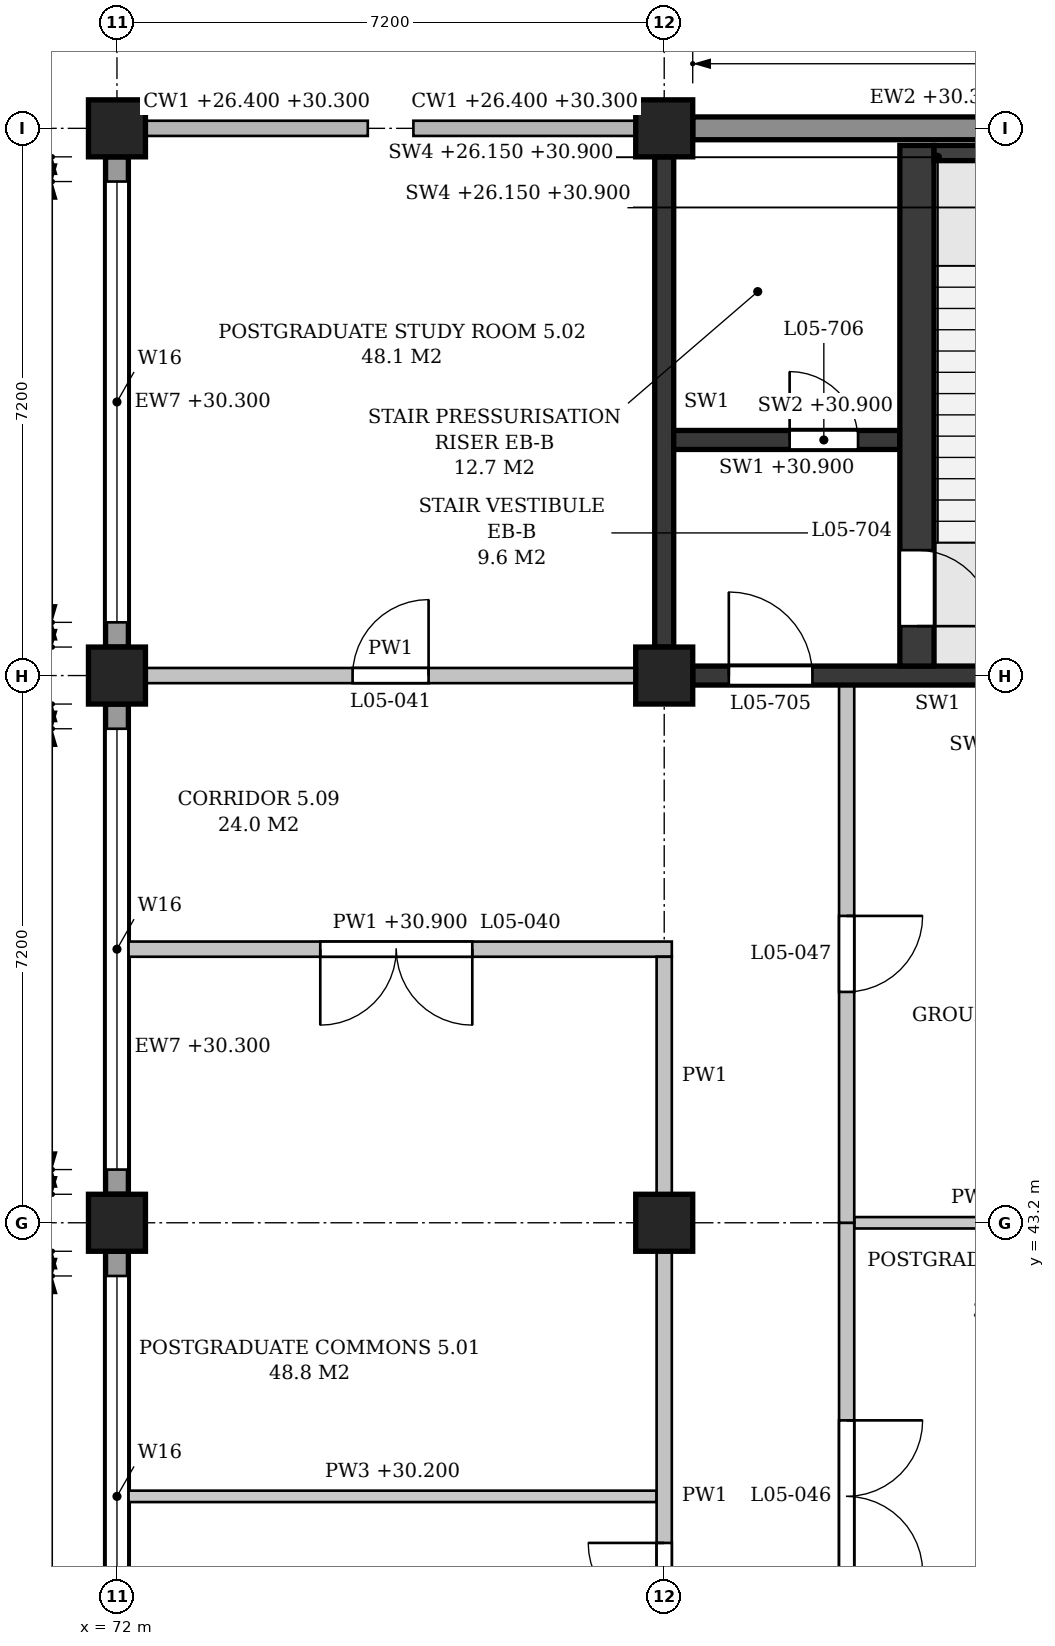
"""IFC4 building model, lengths in metres.
Left out: names, types, materials, properties, quantities, classifications, styles, units other than length and angle.
Written with IfcOpenShell. Run it as: python <this file> out.ifc"""

import sys

from ifc_helpers import new_model, si_unit, direction, frame, frame_2d, origin, origin_2d, place, context, subcontext, project, spatial, polyline, rectangle, outline, extrude, element, fill, save


model = new_model("IFC4")
c1 = context("Model", 3, precision=1e-05, world=origin(), true_north=direction((0.0, 1.0)))
c2 = subcontext(c1, "Body", "Model", "MODEL_VIEW")
j1 = project(units=[si_unit("LENGTHUNIT", "METRE"), si_unit("PLANEANGLEUNIT", "RADIAN")], contexts=[c1])
p1 = place(None, origin())
s1 = spatial("IfcSite", under=j1, at=p1, CompositionType="ELEMENT")
p2 = place(p1, origin())
s2 = spatial("IfcBuilding", under=s1, at=p2, CompositionType="ELEMENT")
p3 = place(p2, frame((0.0, 0.0, 26.4)))
s3 = spatial("IfcBuildingStorey", under=s2, at=p3, CompositionType="ELEMENT", Elevation=26.4)
for number, where, z_axis, x_axis in (
    (1, (72.0, 43.2, 0.0), (0.0, 0.0, 1.0), (1.0, 0.0, 0.0)),
    (2, (72.0, 50.4, 0.0), (0.0, 0.0, 1.0), (1.0, 0.0, 0.0)),
    (3, (72.0, 57.6, 0.0), (0.0, 0.0, 1.0), (1.0, 0.0, 0.0)),
    (4, (79.2, 43.2, 0.0), (0.0, 0.0, 1.0), (1.0, 0.0, 0.0)),
    (5, (79.2, 50.4, 0.0), (0.0, 0.0, 1.0), (1.0, 0.0, 0.0)),
    (6, (79.2, 57.6, 0.0), (0.0, 0.0, 1.0), (1.0, 0.0, 0.0)),
):
    element("IfcColumn", number, at=place(p3, frame(where, z_axis=z_axis, x_axis=x_axis)), inside=s3, PredefinedType="COLUMN", context=c2, shape_type="SweptSolid", body=[
        extrude(rectangle(XDim=0.75, YDim=0.75, at=origin_2d()), origin(), (0.0, 0.0, 1.0), 4.8),
    ])
p4 = place(p3, frame((86.025, 57.6, 0.0), z_axis=(0.0, 0.0, 1.0), x_axis=(-1.0, 0.0, 0.0)))
e7 = element("IfcWall", 7, at=p4, inside=s3, PredefinedType="STANDARD", context=c2, shape_type="SweptSolid", body=[
    extrude(rectangle(XDim=6.45, YDim=0.3, at=frame_2d((3.225, 0.0))), origin(), (0.0, 0.0, 1.0), 3.9),
])
p5 = place(p4, frame((0.975, 0.0, 0.9)))
e8 = element("IfcOpeningElement", 8, at=p5, cuts=e7, PredefinedType="OPENING", context=c2, shape_type="SweptSolid", body=[
    extrude(outline(polyline([(0.0, 0.0), (0.9, 0.0), (0.9, 2.05), (0.45, 2.5), (0.0, 2.05), (0.0, 0.0)])), frame((0.0, 0.16, 0.0), z_axis=(0.0, -1.0, 0.0), x_axis=(1.0, 0.0, 0.0)), (0.0, 0.0, 1.0), 0.32),
])
p6 = place(p3, frame((72.0, 36.375, 0.0), z_axis=(0.0, 0.0, 1.0), x_axis=(0.0, 1.0, 0.0)))
e9 = element("IfcWall", 9, at=p6, inside=s3, PredefinedType="STANDARD", context=c2, shape_type="SweptSolid", body=[
    extrude(rectangle(XDim=6.45, YDim=0.3, at=frame_2d((3.225, 0.0))), origin(), (0.0, 0.0, 1.0), 3.9),
])
p7 = place(p6, frame((0.325, 0.0, 1.5)))
e10 = element("IfcOpeningElement", 10, at=p7, cuts=e9, PredefinedType="OPENING", context=c2, shape_type="SweptSolid", body=[
    extrude(outline(polyline([(0.0, 0.0), (5.8, 0.0), (5.8, 0.4), (2.9, 1.9), (0.0, 0.4), (0.0, 0.0)])), frame((0.0, 0.16, 0.0), z_axis=(0.0, -1.0, 0.0), x_axis=(1.0, 0.0, 0.0)), (0.0, 0.0, 1.0), 0.32),
])
p8 = place(p3, frame((72.0, 43.575, 0.0), z_axis=(0.0, 0.0, 1.0), x_axis=(0.0, 1.0, 0.0)))
e11 = element("IfcWall", 11, at=p8, inside=s3, PredefinedType="STANDARD", context=c2, shape_type="SweptSolid", body=[
    extrude(rectangle(XDim=6.45, YDim=0.3, at=frame_2d((3.225, 0.0))), origin(), (0.0, 0.0, 1.0), 3.9),
])
p9 = place(p8, frame((0.325, 0.0, 1.5)))
e12 = element("IfcOpeningElement", 12, at=p9, cuts=e11, PredefinedType="OPENING", context=c2, shape_type="SweptSolid", body=[
    extrude(outline(polyline([(0.0, 0.0), (5.8, 0.0), (5.8, 0.4), (2.9, 1.9), (0.0, 0.4), (0.0, 0.0)])), frame((0.0, 0.16, 0.0), z_axis=(0.0, -1.0, 0.0), x_axis=(1.0, 0.0, 0.0)), (0.0, 0.0, 1.0), 0.32),
])
p10 = place(p3, frame((72.0, 50.775, 0.0), z_axis=(0.0, 0.0, 1.0), x_axis=(0.0, 1.0, 0.0)))
e13 = element("IfcWall", 13, at=p10, inside=s3, PredefinedType="STANDARD", context=c2, shape_type="SweptSolid", body=[
    extrude(rectangle(XDim=6.45, YDim=0.3, at=frame_2d((3.225, 0.0))), origin(), (0.0, 0.0, 1.0), 3.9),
])
p11 = place(p10, frame((0.325, 0.0, 1.5)))
e14 = element("IfcOpeningElement", 14, at=p11, cuts=e13, PredefinedType="OPENING", context=c2, shape_type="SweptSolid", body=[
    extrude(outline(polyline([(0.0, 0.0), (5.8, 0.0), (5.8, 0.4), (2.9, 1.9), (0.0, 0.4), (0.0, 0.0)])), frame((0.0, 0.16, 0.0), z_axis=(0.0, -1.0, 0.0), x_axis=(1.0, 0.0, 0.0)), (0.0, 0.0, 1.0), 0.32),
])
p12 = place(p3, frame((79.575, 50.4, 0.0), z_axis=(0.0, 0.0, 1.0), x_axis=(1.0, 0.0, 0.0)))
e15 = element("IfcWall", 15, at=p12, inside=s3, PredefinedType="SHEAR", context=c2, shape_type="SweptSolid", body=[
    extrude(rectangle(XDim=6.45, YDim=0.25, at=frame_2d((3.225, 0.0))), origin(), (0.0, 0.0, 1.0), 3.85),
])
p13 = place(p12, frame((0.475, 0.0, 0.0)))
e16 = element("IfcOpeningElement", 16, at=p13, cuts=e15, PredefinedType="OPENING", context=c2, shape_type="SweptSolid", body=[
    extrude(rectangle(XDim=1.1, YDim=2.1, at=frame_2d((0.55, 1.05))), frame((0.0, 0.135, 0.0), z_axis=(0.0, -1.0, 0.0), x_axis=(1.0, 0.0, 0.0)), (0.0, 0.0, 1.0), 0.27),
])
p14 = place(p3, frame((79.2, 50.775, 0.0), z_axis=(0.0, 0.0, 1.0), x_axis=(0.0, 1.0, 0.0)))
e17 = element("IfcWall", 17, at=p14, inside=s3, PredefinedType="SHEAR", context=c2, shape_type="SweptSolid", body=[
    extrude(rectangle(XDim=6.45, YDim=0.25, at=frame_2d((3.225, 0.0))), origin(), (0.0, 0.0, 1.0), 3.85),
])
p15 = place(p3, frame((82.75, 57.275, -0.25), z_axis=(0.0, 0.0, 1.0), x_axis=(1.0, 0.0, 0.0)))
e18 = element("IfcWall", 18, at=p15, inside=s3, PredefinedType="SHEAR", context=c2, shape_type="SweptSolid", body=[
    extrude(rectangle(XDim=1.4, YDim=0.2, at=frame_2d((0.7, 0.0))), origin(), (0.0, 0.0, 1.0), 4.75),
])
p16 = place(p3, frame((82.525, 50.525, 0.0), z_axis=(0.0, 0.0, 1.0), x_axis=(0.0, 1.0, 0.0)))
e19 = element("IfcWall", 19, at=p16, inside=s3, PredefinedType="SHEAR", context=c2, shape_type="SweptSolid", body=[
    extrude(rectangle(XDim=6.85, YDim=0.45, at=frame_2d((3.425, 0.0))), origin(), (0.0, 0.0, 1.0), 4.5),
])
p17 = place(p16, frame((0.525, 0.0, 0.0)))
e20 = element("IfcOpeningElement", 20, at=p17, cuts=e19, PredefinedType="OPENING", context=c2, shape_type="SweptSolid", body=[
    extrude(rectangle(XDim=1.0, YDim=2.1, at=frame_2d((0.5, 1.05))), frame((0.0, 0.235, 0.0), z_axis=(0.0, -1.0, 0.0), x_axis=(1.0, 0.0, 0.0)), (0.0, 0.0, 1.0), 0.47),
])
p18 = place(p3, frame((79.325, 53.5, 0.0), z_axis=(0.0, 0.0, 1.0), x_axis=(1.0, 0.0, 0.0)))
e21 = element("IfcWall", 21, at=p18, inside=s3, PredefinedType="SHEAR", context=c2, shape_type="SweptSolid", body=[
    extrude(rectangle(XDim=2.975, YDim=0.25, at=frame_2d((1.488, 0.0))), origin(), (0.0, 0.0, 1.0), 4.5),
])
p19 = place(p18, frame((1.525, 0.0, 0.0)))
e22 = element("IfcOpeningElement", 22, at=p19, cuts=e21, PredefinedType="OPENING", context=c2, shape_type="SweptSolid", body=[
    extrude(rectangle(XDim=0.9, YDim=2.1, at=frame_2d((0.45, 1.05))), frame((0.0, 0.135, 0.0), z_axis=(0.0, -1.0, 0.0), x_axis=(1.0, 0.0, 0.0)), (0.0, 0.0, 1.0), 0.27),
])
p20 = place(p3, frame((72.15, 39.6, 0.0), z_axis=(0.0, 0.0, 1.0), x_axis=(1.0, 0.0, 0.0)))
e23 = element("IfcWall", 23, at=p20, inside=s3, PredefinedType="PARTITIONING", context=c2, shape_type="SweptSolid", body=[
    extrude(rectangle(XDim=6.95, YDim=0.15, at=frame_2d((3.475, 0.0))), origin(), (0.0, 0.0, 1.0), 3.8),
])
p21 = place(p3, frame((81.7, 43.2, 0.0), z_axis=(0.0, 0.0, 1.0), x_axis=(1.0, 0.0, 0.0)))
e24 = element("IfcWall", 24, at=p21, inside=s3, PredefinedType="PARTITIONING", context=c2, shape_type="SweptSolid", body=[
    extrude(rectangle(XDim=4.325, YDim=0.15, at=frame_2d((2.163, 0.0))), origin(), (0.0, 0.0, 1.0), 3.8),
])
p22 = place(p3, frame((72.15, 46.8, 0.0), z_axis=(0.0, 0.0, 1.0), x_axis=(1.0, 0.0, 0.0)))
e25 = element("IfcWall", 25, at=p22, inside=s3, PredefinedType="PARTITIONING", context=c2, shape_type="SweptSolid", body=[
    extrude(outline(polyline([(0.0, 0.0), (7.15, 0.0), (7.15, 3.85), (6.825, 3.85), (6.825, 4.5), (0.05, 4.5), (0.05, 3.9), (0.0, 3.9), (0.0, 0.0)])), frame((0.0, 0.1, 0.0), z_axis=(0.0, -1.0, 0.0), x_axis=(1.0, 0.0, 0.0)), (0.0, 0.0, 1.0), 0.2),
])
p23 = place(p22, frame((2.525, 0.0, 0.0)))
e26 = element("IfcOpeningElement", 26, at=p23, cuts=e25, PredefinedType="OPENING", context=c2, shape_type="SweptSolid", body=[
    extrude(rectangle(XDim=2.0, YDim=2.1, at=frame_2d((1.0, 1.05))), frame((0.0, 0.11, 0.0), z_axis=(0.0, -1.0, 0.0), x_axis=(1.0, 0.0, 0.0)), (0.0, 0.0, 1.0), 0.22),
])
p24 = place(p3, frame((72.375, 50.4, 0.0), z_axis=(0.0, 0.0, 1.0), x_axis=(1.0, 0.0, 0.0)))
e27 = element("IfcWall", 27, at=p24, inside=s3, PredefinedType="PARTITIONING", context=c2, shape_type="SweptSolid", body=[
    extrude(rectangle(XDim=6.45, YDim=0.2, at=frame_2d((3.225, 0.0))), origin(), (0.0, 0.0, 1.0), 3.85),
])
p25 = place(p24, frame((2.725, 0.0, 0.0)))
e28 = element("IfcOpeningElement", 28, at=p25, cuts=e27, PredefinedType="OPENING", context=c2, shape_type="SweptSolid", body=[
    extrude(rectangle(XDim=1.0, YDim=2.1, at=frame_2d((0.5, 1.05))), frame((0.0, 0.11, 0.0), z_axis=(0.0, -1.0, 0.0), x_axis=(1.0, 0.0, 0.0)), (0.0, 0.0, 1.0), 0.22),
])
p26 = place(p3, frame((79.2, 36.375, 0.0), z_axis=(0.0, 0.0, 1.0), x_axis=(0.0, 1.0, 0.0)))
e29 = element("IfcWall", 29, at=p26, inside=s3, PredefinedType="PARTITIONING", context=c2, shape_type="SweptSolid", body=[
    extrude(rectangle(XDim=6.45, YDim=0.2, at=frame_2d((3.225, 0.0))), origin(), (0.0, 0.0, 1.0), 3.85),
])
p27 = place(p26, frame((0.613, 0.0, 0.0)))
e30 = element("IfcOpeningElement", 30, at=p27, cuts=e29, PredefinedType="OPENING", context=c2, shape_type="SweptSolid", body=[
    extrude(rectangle(XDim=2.0, YDim=2.1, at=frame_2d((1.0, 1.05))), frame((0.0, 0.11, 0.0), z_axis=(0.0, -1.0, 0.0), x_axis=(1.0, 0.0, 0.0)), (0.0, 0.0, 1.0), 0.22),
])
p28 = place(p3, frame((79.2, 43.575, 0.0), z_axis=(0.0, 0.0, 1.0), x_axis=(0.0, 1.0, 0.0)))
e31 = element("IfcWall", 31, at=p28, inside=s3, PredefinedType="PARTITIONING", context=c2, shape_type="SweptSolid", body=[
    extrude(rectangle(XDim=3.125, YDim=0.2, at=frame_2d((1.562, 0.0))), origin(), (0.0, 0.0, 1.0), 3.85),
])
p29 = place(p3, frame((81.6, 36.0, 0.0), z_axis=(0.0, 0.0, 1.0), x_axis=(0.0, 1.0, 0.0)))
e32 = element("IfcWall", 32, at=p29, inside=s3, PredefinedType="PARTITIONING", context=c2, shape_type="SweptSolid", body=[
    extrude(outline(polyline([(0.0, 0.0), (7.2, 0.0), (7.2, 3.85), (6.975, 3.85), (6.975, 4.5), (0.225, 4.5), (0.225, 3.85), (0.0, 3.85), (0.0, 0.0)])), frame((0.0, 0.1, 0.0), z_axis=(0.0, -1.0, 0.0), x_axis=(1.0, 0.0, 0.0)), (0.0, 0.0, 1.0), 0.2),
])
p30 = place(p29, frame((2.6, 0.0, 0.0)))
e33 = element("IfcOpeningElement", 33, at=p30, cuts=e32, PredefinedType="OPENING", context=c2, shape_type="SweptSolid", body=[
    extrude(rectangle(XDim=2.0, YDim=2.1, at=frame_2d((1.0, 1.05))), frame((0.0, 0.11, 0.0), z_axis=(0.0, -1.0, 0.0), x_axis=(1.0, 0.0, 0.0)), (0.0, 0.0, 1.0), 0.22),
])
p31 = place(p3, frame((81.6, 43.2, 0.0), z_axis=(0.0, 0.0, 1.0), x_axis=(0.0, 1.0, 0.0)))
e34 = element("IfcWall", 34, at=p31, inside=s3, PredefinedType="PARTITIONING", context=c2, shape_type="SweptSolid", body=[
    extrude(outline(polyline([(0.0, 0.0), (7.075, 0.0), (7.075, 3.85), (6.975, 3.85), (6.975, 4.5), (0.225, 4.5), (0.225, 3.85), (0.0, 3.85), (0.0, 0.0)])), frame((0.0, 0.1, 0.0), z_axis=(0.0, -1.0, 0.0), x_axis=(1.0, 0.0, 0.0)), (0.0, 0.0, 1.0), 0.2),
])
p32 = place(p31, frame((3.038, 0.0, 0.0)))
e35 = element("IfcOpeningElement", 35, at=p32, cuts=e34, PredefinedType="OPENING", context=c2, shape_type="SweptSolid", body=[
    extrude(rectangle(XDim=1.0, YDim=2.1, at=frame_2d((0.5, 1.05))), frame((0.0, 0.11, 0.0), z_axis=(0.0, -1.0, 0.0), x_axis=(1.0, 0.0, 0.0)), (0.0, 0.0, 1.0), 0.22),
])
p33 = place(p7, origin())
e36 = element("IfcWindow", 36, at=p33, inside=s3, PartitioningType="TRIPLE_PANEL_VERTICAL", PredefinedType="WINDOW", context=c2, shape_type="SweptSolid", body=[
    extrude(outline(polyline([(0.0, 0.0), (5.8, 0.0), (5.8, 0.4), (2.9, 1.9), (0.0, 0.4), (0.0, 0.0)])), frame((0.0, 0.03, 0.0), z_axis=(0.0, -1.0, 0.0), x_axis=(1.0, 0.0, 0.0)), (0.0, 0.0, 1.0), 0.06),
])
fill(e10, e36)
p34 = place(p9, origin())
e37 = element("IfcWindow", 37, at=p34, inside=s3, PartitioningType="TRIPLE_PANEL_VERTICAL", PredefinedType="WINDOW", context=c2, shape_type="SweptSolid", body=[
    extrude(outline(polyline([(0.0, 0.0), (5.8, 0.0), (5.8, 0.4), (2.9, 1.9), (0.0, 0.4), (0.0, 0.0)])), frame((0.0, 0.03, 0.0), z_axis=(0.0, -1.0, 0.0), x_axis=(1.0, 0.0, 0.0)), (0.0, 0.0, 1.0), 0.06),
])
fill(e12, e37)
p35 = place(p11, origin())
e38 = element("IfcWindow", 38, at=p35, inside=s3, PartitioningType="TRIPLE_PANEL_VERTICAL", PredefinedType="WINDOW", context=c2, shape_type="SweptSolid", body=[
    extrude(outline(polyline([(0.0, 0.0), (5.8, 0.0), (5.8, 0.4), (2.9, 1.9), (0.0, 0.4), (0.0, 0.0)])), frame((0.0, 0.03, 0.0), z_axis=(0.0, -1.0, 0.0), x_axis=(1.0, 0.0, 0.0)), (0.0, 0.0, 1.0), 0.06),
])
fill(e14, e38)
p36 = place(p17, frame((1.0, 0.0, 0.0), z_axis=(0.0, 0.0, 1.0), x_axis=(-1.0, 0.0, 0.0)))
e39 = element("IfcDoor", 39, at=p36, inside=s3, OperationType="SINGLE_SWING_RIGHT", PredefinedType="DOOR", context=c2, shape_type="SweptSolid", body=[
    extrude(rectangle(XDim=1.0, YDim=2.1, at=frame_2d((0.5, 1.05))), frame((0.0, 0.025, 0.0), z_axis=(0.0, -1.0, 0.0), x_axis=(1.0, 0.0, 0.0)), (0.0, 0.0, 1.0), 0.05),
])
fill(e20, e39)
p37 = place(p13, origin())
e40 = element("IfcDoor", 40, at=p37, inside=s3, OperationType="SINGLE_SWING_LEFT", PredefinedType="DOOR", context=c2, shape_type="SweptSolid", body=[
    extrude(rectangle(XDim=1.1, YDim=2.1, at=frame_2d((0.55, 1.05))), frame((0.0, 0.025, 0.0), z_axis=(0.0, -1.0, 0.0), x_axis=(1.0, 0.0, 0.0)), (0.0, 0.0, 1.0), 0.05),
])
fill(e16, e40)
p38 = place(p19, origin())
e41 = element("IfcDoor", 41, at=p38, inside=s3, OperationType="SINGLE_SWING_LEFT", PredefinedType="DOOR", context=c2, shape_type="SweptSolid", body=[
    extrude(rectangle(XDim=0.9, YDim=2.1, at=frame_2d((0.45, 1.05))), frame((0.0, 0.025, 0.0), z_axis=(0.0, -1.0, 0.0), x_axis=(1.0, 0.0, 0.0)), (0.0, 0.0, 1.0), 0.05),
])
fill(e22, e41)
p39 = place(p27, origin())
e42 = element("IfcDoor", 42, at=p39, inside=s3, OperationType="DOUBLE_DOOR_SINGLE_SWING", PredefinedType="DOOR", context=c2, shape_type="SweptSolid", body=[
    extrude(rectangle(XDim=2.0, YDim=2.1, at=frame_2d((1.0, 1.05))), frame((0.0, 0.025, 0.0), z_axis=(0.0, -1.0, 0.0), x_axis=(1.0, 0.0, 0.0)), (0.0, 0.0, 1.0), 0.05),
])
fill(e30, e42)
p40 = place(p23, origin())
e43 = element("IfcDoor", 43, at=p40, inside=s3, OperationType="DOUBLE_DOOR_SINGLE_SWING", PredefinedType="DOOR", context=c2, shape_type="SweptSolid", body=[
    extrude(rectangle(XDim=2.0, YDim=2.1, at=frame_2d((1.0, 1.05))), frame((0.0, 0.025, 0.0), z_axis=(0.0, -1.0, 0.0), x_axis=(1.0, 0.0, 0.0)), (0.0, 0.0, 1.0), 0.05),
])
fill(e26, e43)
p41 = place(p25, origin())
e44 = element("IfcDoor", 44, at=p41, inside=s3, OperationType="SINGLE_SWING_RIGHT", PredefinedType="DOOR", context=c2, shape_type="SweptSolid", body=[
    extrude(rectangle(XDim=1.0, YDim=2.1, at=frame_2d((0.5, 1.05))), frame((0.0, 0.025, 0.0), z_axis=(0.0, -1.0, 0.0), x_axis=(1.0, 0.0, 0.0)), (0.0, 0.0, 1.0), 0.05),
])
fill(e28, e44)
p42 = place(p30, origin())
e45 = element("IfcDoor", 45, at=p42, inside=s3, OperationType="DOUBLE_DOOR_SINGLE_SWING", PredefinedType="DOOR", context=c2, shape_type="SweptSolid", body=[
    extrude(rectangle(XDim=2.0, YDim=2.1, at=frame_2d((1.0, 1.05))), frame((0.0, 0.025, 0.0), z_axis=(0.0, -1.0, 0.0), x_axis=(1.0, 0.0, 0.0)), (0.0, 0.0, 1.0), 0.05),
])
fill(e33, e45)
p43 = place(p32, frame((1.0, 0.0, 0.0), z_axis=(0.0, 0.0, 1.0), x_axis=(-1.0, 0.0, 0.0)))
e46 = element("IfcDoor", 46, at=p43, inside=s3, OperationType="SINGLE_SWING_LEFT", PredefinedType="DOOR", context=c2, shape_type="SweptSolid", body=[
    extrude(rectangle(XDim=1.0, YDim=2.1, at=frame_2d((0.5, 1.05))), frame((0.0, 0.025, 0.0), z_axis=(0.0, -1.0, 0.0), x_axis=(1.0, 0.0, 0.0)), (0.0, 0.0, 1.0), 0.05),
])
fill(e35, e46)
save(model, sys.argv[1])
